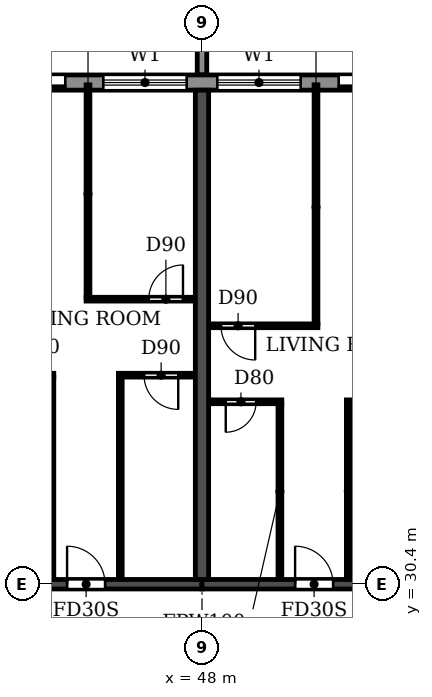
"""IFC4 building model, lengths in metres.
Left out: names, types, materials, properties, quantities, classifications, styles, units other than length and angle.
Written with IfcOpenShell. Run it as: python <this file> out.ifc"""

import sys

from ifc_helpers import new_model, si_unit, direction, frame, frame_2d, origin, place, context, subcontext, project, spatial, polyline, rectangle, outline, extrude, source, transform, mapped, element, fill, save


model = new_model("IFC4")
c1 = context("Model", 3, precision=1e-05, world=origin(), true_north=direction((0.0, 1.0)))
c2 = subcontext(c1, "Body", "Model", "MODEL_VIEW")
j1 = project(units=[si_unit("LENGTHUNIT", "METRE"), si_unit("PLANEANGLEUNIT", "RADIAN")], contexts=[c1])
p1 = place(None, origin())
s1 = spatial("IfcSite", under=j1, at=p1, CompositionType="ELEMENT")
p2 = place(p1, origin())
s2 = spatial("IfcBuilding", under=s1, at=p2, CompositionType="ELEMENT")
p3 = place(p2, frame((0.0, 0.0, 76.2)))
s3 = spatial("IfcBuildingStorey", under=s2, at=p3, CompositionType="ELEMENT", Elevation=76.2)
p4 = place(p3, frame((48.0, 30.525, 0.0), z_axis=(0.0, 0.0, 1.0), x_axis=(0.0, 1.0, 0.0)))
e1 = element("IfcWall", 1, at=p4, inside=s3, PredefinedType="SHEAR", context=c2, shape_type="SweptSolid", body=[
    extrude(rectangle(XDim=12.875, YDim=0.35, at=frame_2d((6.438, 0.0))), origin(), (0.0, 0.0, 1.0), 3.06),
])
p5 = place(p3, frame((42.0, 30.4, 0.0), z_axis=(0.0, 0.0, 1.0), x_axis=(1.0, 0.0, 0.0)))
e2 = element("IfcWall", 2, at=p5, inside=s3, PredefinedType="SHEAR", context=c2, shape_type="SweptSolid", body=[
    extrude(rectangle(XDim=6.0, YDim=0.25, at=frame_2d((3.0, 0.0))), origin(), (0.0, 0.0, 1.0), 2.46),
])
p6 = place(p5, frame((2.45, 0.0, 0.0)))
e3 = element("IfcOpeningElement", 3, at=p6, cuts=e2, PredefinedType="OPENING", context=c2, shape_type="SweptSolid", body=[
    extrude(rectangle(XDim=1.0, YDim=2.1, at=frame_2d((0.5, 1.05))), frame((0.0, 0.135, 0.0), z_axis=(0.0, -1.0, 0.0), x_axis=(1.0, 0.0, 0.0)), (0.0, 0.0, 1.0), 0.27),
])
p7 = place(p3, frame((48.0, 30.4, 0.0), z_axis=(0.0, 0.0, 1.0), x_axis=(1.0, 0.0, 0.0)))
e4 = element("IfcWall", 4, at=p7, inside=s3, PredefinedType="SHEAR", context=c2, shape_type="SweptSolid", body=[
    extrude(rectangle(XDim=6.0, YDim=0.25, at=frame_2d((3.0, 0.0))), origin(), (0.0, 0.0, 1.0), 2.46),
])
p8 = place(p7, frame((2.45, 0.0, 0.0)))
e5 = element("IfcOpeningElement", 5, at=p8, cuts=e4, PredefinedType="OPENING", context=c2, shape_type="SweptSolid", body=[
    extrude(rectangle(XDim=1.0, YDim=2.1, at=frame_2d((0.5, 1.05))), frame((0.0, 0.135, 0.0), z_axis=(0.0, -1.0, 0.0), x_axis=(1.0, 0.0, 0.0)), (0.0, 0.0, 1.0), 0.27),
])
p9 = place(p3, frame((91.317, 43.6, 0.0), z_axis=(0.0, 0.0, 1.0), x_axis=(-1.0, 0.0, 0.0)))
e6 = element("IfcWall", 6, at=p9, inside=s3, PredefinedType="STANDARD", context=c2, shape_type="SweptSolid", body=[
    extrude(rectangle(XDim=80.634, YDim=0.4, at=frame_2d((40.317, 0.0))), origin(), (0.0, 0.0, 1.0), 3.06),
])
p10 = place(p9, frame((76.717, 0.0, 0.9)))
e7 = element("IfcOpeningElement", 7, at=p10, cuts=e6, PredefinedType="OPENING", context=c2, shape_type="SweptSolid", body=[
    extrude(rectangle(XDim=2.2, YDim=1.5, at=frame_2d((1.1, 0.75))), frame((0.0, 0.21, 0.0), z_axis=(0.0, -1.0, 0.0), x_axis=(1.0, 0.0, 0.0)), (0.0, 0.0, 1.0), 0.42),
])
p11 = place(p9, frame((73.917, 0.0, 0.0)))
e8 = element("IfcOpeningElement", 8, at=p11, cuts=e6, PredefinedType="OPENING", context=c2, shape_type="SweptSolid", body=[
    extrude(rectangle(XDim=1.8, YDim=2.4, at=frame_2d((0.9, 1.2))), frame((0.0, 0.21, 0.0), z_axis=(0.0, -1.0, 0.0), x_axis=(1.0, 0.0, 0.0)), (0.0, 0.0, 1.0), 0.42),
])
p12 = place(p9, frame((70.917, 0.0, 0.0)))
e9 = element("IfcOpeningElement", 9, at=p12, cuts=e6, PredefinedType="OPENING", context=c2, shape_type="SweptSolid", body=[
    extrude(rectangle(XDim=1.8, YDim=2.4, at=frame_2d((0.9, 1.2))), frame((0.0, 0.21, 0.0), z_axis=(0.0, -1.0, 0.0), x_axis=(1.0, 0.0, 0.0)), (0.0, 0.0, 1.0), 0.42),
])
p13 = place(p9, frame((67.717, 0.0, 0.9)))
e10 = element("IfcOpeningElement", 10, at=p13, cuts=e6, PredefinedType="OPENING", context=c2, shape_type="SweptSolid", body=[
    extrude(rectangle(XDim=2.2, YDim=1.5, at=frame_2d((1.1, 0.75))), frame((0.0, 0.21, 0.0), z_axis=(0.0, -1.0, 0.0), x_axis=(1.0, 0.0, 0.0)), (0.0, 0.0, 1.0), 0.42),
])
p14 = place(p9, frame((64.717, 0.0, 0.9)))
e11 = element("IfcOpeningElement", 11, at=p14, cuts=e6, PredefinedType="OPENING", context=c2, shape_type="SweptSolid", body=[
    extrude(rectangle(XDim=2.2, YDim=1.5, at=frame_2d((1.1, 0.75))), frame((0.0, 0.21, 0.0), z_axis=(0.0, -1.0, 0.0), x_axis=(1.0, 0.0, 0.0)), (0.0, 0.0, 1.0), 0.42),
])
p15 = place(p9, frame((61.917, 0.0, 0.0)))
e12 = element("IfcOpeningElement", 12, at=p15, cuts=e6, PredefinedType="OPENING", context=c2, shape_type="SweptSolid", body=[
    extrude(rectangle(XDim=1.8, YDim=2.4, at=frame_2d((0.9, 1.2))), frame((0.0, 0.21, 0.0), z_axis=(0.0, -1.0, 0.0), x_axis=(1.0, 0.0, 0.0)), (0.0, 0.0, 1.0), 0.42),
])
p16 = place(p9, frame((58.717, 0.0, 0.9)))
e13 = element("IfcOpeningElement", 13, at=p16, cuts=e6, PredefinedType="OPENING", context=c2, shape_type="SweptSolid", body=[
    extrude(rectangle(XDim=2.2, YDim=1.5, at=frame_2d((1.1, 0.75))), frame((0.0, 0.21, 0.0), z_axis=(0.0, -1.0, 0.0), x_axis=(1.0, 0.0, 0.0)), (0.0, 0.0, 1.0), 0.42),
])
p17 = place(p9, frame((55.917, 0.0, 0.0)))
e14 = element("IfcOpeningElement", 14, at=p17, cuts=e6, PredefinedType="OPENING", context=c2, shape_type="SweptSolid", body=[
    extrude(rectangle(XDim=1.8, YDim=2.4, at=frame_2d((0.9, 1.2))), frame((0.0, 0.21, 0.0), z_axis=(0.0, -1.0, 0.0), x_axis=(1.0, 0.0, 0.0)), (0.0, 0.0, 1.0), 0.42),
])
p18 = place(p9, frame((52.717, 0.0, 0.9)))
e15 = element("IfcOpeningElement", 15, at=p18, cuts=e6, PredefinedType="OPENING", context=c2, shape_type="SweptSolid", body=[
    extrude(rectangle(XDim=2.2, YDim=1.5, at=frame_2d((1.1, 0.75))), frame((0.0, 0.21, 0.0), z_axis=(0.0, -1.0, 0.0), x_axis=(1.0, 0.0, 0.0)), (0.0, 0.0, 1.0), 0.42),
])
p19 = place(p9, frame((49.717, 0.0, 0.9)))
e16 = element("IfcOpeningElement", 16, at=p19, cuts=e6, PredefinedType="OPENING", context=c2, shape_type="SweptSolid", body=[
    extrude(rectangle(XDim=2.2, YDim=1.5, at=frame_2d((1.1, 0.75))), frame((0.0, 0.21, 0.0), z_axis=(0.0, -1.0, 0.0), x_axis=(1.0, 0.0, 0.0)), (0.0, 0.0, 1.0), 0.42),
])
p20 = place(p9, frame((46.917, 0.0, 0.0)))
e17 = element("IfcOpeningElement", 17, at=p20, cuts=e6, PredefinedType="OPENING", context=c2, shape_type="SweptSolid", body=[
    extrude(rectangle(XDim=1.8, YDim=2.4, at=frame_2d((0.9, 1.2))), frame((0.0, 0.21, 0.0), z_axis=(0.0, -1.0, 0.0), x_axis=(1.0, 0.0, 0.0)), (0.0, 0.0, 1.0), 0.42),
])
p21 = place(p9, frame((43.717, 0.0, 0.9)))
e18 = element("IfcOpeningElement", 18, at=p21, cuts=e6, PredefinedType="OPENING", context=c2, shape_type="SweptSolid", body=[
    extrude(rectangle(XDim=2.2, YDim=1.5, at=frame_2d((1.1, 0.75))), frame((0.0, 0.21, 0.0), z_axis=(0.0, -1.0, 0.0), x_axis=(1.0, 0.0, 0.0)), (0.0, 0.0, 1.0), 0.42),
])
p22 = place(p9, frame((40.717, 0.0, 0.9)))
e19 = element("IfcOpeningElement", 19, at=p22, cuts=e6, PredefinedType="OPENING", context=c2, shape_type="SweptSolid", body=[
    extrude(rectangle(XDim=2.2, YDim=1.5, at=frame_2d((1.1, 0.75))), frame((0.0, 0.21, 0.0), z_axis=(0.0, -1.0, 0.0), x_axis=(1.0, 0.0, 0.0)), (0.0, 0.0, 1.0), 0.42),
])
p23 = place(p9, frame((37.917, 0.0, 0.0)))
e20 = element("IfcOpeningElement", 20, at=p23, cuts=e6, PredefinedType="OPENING", context=c2, shape_type="SweptSolid", body=[
    extrude(rectangle(XDim=1.8, YDim=2.4, at=frame_2d((0.9, 1.2))), frame((0.0, 0.21, 0.0), z_axis=(0.0, -1.0, 0.0), x_axis=(1.0, 0.0, 0.0)), (0.0, 0.0, 1.0), 0.42),
])
p24 = place(p9, frame((34.717, 0.0, 0.9)))
e21 = element("IfcOpeningElement", 21, at=p24, cuts=e6, PredefinedType="OPENING", context=c2, shape_type="SweptSolid", body=[
    extrude(rectangle(XDim=2.2, YDim=1.5, at=frame_2d((1.1, 0.75))), frame((0.0, 0.21, 0.0), z_axis=(0.0, -1.0, 0.0), x_axis=(1.0, 0.0, 0.0)), (0.0, 0.0, 1.0), 0.42),
])
p25 = place(p9, frame((31.917, 0.0, 0.0)))
e22 = element("IfcOpeningElement", 22, at=p25, cuts=e6, PredefinedType="OPENING", context=c2, shape_type="SweptSolid", body=[
    extrude(rectangle(XDim=1.8, YDim=2.4, at=frame_2d((0.9, 1.2))), frame((0.0, 0.21, 0.0), z_axis=(0.0, -1.0, 0.0), x_axis=(1.0, 0.0, 0.0)), (0.0, 0.0, 1.0), 0.42),
])
p26 = place(p9, frame((28.717, 0.0, 0.9)))
e23 = element("IfcOpeningElement", 23, at=p26, cuts=e6, PredefinedType="OPENING", context=c2, shape_type="SweptSolid", body=[
    extrude(rectangle(XDim=2.2, YDim=1.5, at=frame_2d((1.1, 0.75))), frame((0.0, 0.21, 0.0), z_axis=(0.0, -1.0, 0.0), x_axis=(1.0, 0.0, 0.0)), (0.0, 0.0, 1.0), 0.42),
])
p27 = place(p9, frame((25.717, 0.0, 0.9)))
e24 = element("IfcOpeningElement", 24, at=p27, cuts=e6, PredefinedType="OPENING", context=c2, shape_type="SweptSolid", body=[
    extrude(rectangle(XDim=2.2, YDim=1.5, at=frame_2d((1.1, 0.75))), frame((0.0, 0.21, 0.0), z_axis=(0.0, -1.0, 0.0), x_axis=(1.0, 0.0, 0.0)), (0.0, 0.0, 1.0), 0.42),
])
p28 = place(p9, frame((22.717, 0.0, 0.9)))
e25 = element("IfcOpeningElement", 25, at=p28, cuts=e6, PredefinedType="OPENING", context=c2, shape_type="SweptSolid", body=[
    extrude(rectangle(XDim=2.2, YDim=1.5, at=frame_2d((1.1, 0.75))), frame((0.0, 0.21, 0.0), z_axis=(0.0, -1.0, 0.0), x_axis=(1.0, 0.0, 0.0)), (0.0, 0.0, 1.0), 0.42),
])
p29 = place(p9, frame((19.917, 0.0, 0.0)))
e26 = element("IfcOpeningElement", 26, at=p29, cuts=e6, PredefinedType="OPENING", context=c2, shape_type="SweptSolid", body=[
    extrude(rectangle(XDim=1.8, YDim=2.4, at=frame_2d((0.9, 1.2))), frame((0.0, 0.21, 0.0), z_axis=(0.0, -1.0, 0.0), x_axis=(1.0, 0.0, 0.0)), (0.0, 0.0, 1.0), 0.42),
])
p30 = place(p9, frame((16.717, 0.0, 0.9)))
e27 = element("IfcOpeningElement", 27, at=p30, cuts=e6, PredefinedType="OPENING", context=c2, shape_type="SweptSolid", body=[
    extrude(rectangle(XDim=2.2, YDim=1.5, at=frame_2d((1.1, 0.75))), frame((0.0, 0.21, 0.0), z_axis=(0.0, -1.0, 0.0), x_axis=(1.0, 0.0, 0.0)), (0.0, 0.0, 1.0), 0.42),
])
p31 = place(p9, frame((13.717, 0.0, 0.9)))
e28 = element("IfcOpeningElement", 28, at=p31, cuts=e6, PredefinedType="OPENING", context=c2, shape_type="SweptSolid", body=[
    extrude(rectangle(XDim=2.2, YDim=1.5, at=frame_2d((1.1, 0.75))), frame((0.0, 0.21, 0.0), z_axis=(0.0, -1.0, 0.0), x_axis=(1.0, 0.0, 0.0)), (0.0, 0.0, 1.0), 0.42),
])
p32 = place(p9, frame((10.717, 0.0, 0.9)))
e29 = element("IfcOpeningElement", 29, at=p32, cuts=e6, PredefinedType="OPENING", context=c2, shape_type="SweptSolid", body=[
    extrude(rectangle(XDim=2.2, YDim=1.5, at=frame_2d((1.1, 0.75))), frame((0.0, 0.21, 0.0), z_axis=(0.0, -1.0, 0.0), x_axis=(1.0, 0.0, 0.0)), (0.0, 0.0, 1.0), 0.42),
])
p33 = place(p9, frame((7.917, 0.0, 0.0)))
e30 = element("IfcOpeningElement", 30, at=p33, cuts=e6, PredefinedType="OPENING", context=c2, shape_type="SweptSolid", body=[
    extrude(rectangle(XDim=1.8, YDim=2.4, at=frame_2d((0.9, 1.2))), frame((0.0, 0.21, 0.0), z_axis=(0.0, -1.0, 0.0), x_axis=(1.0, 0.0, 0.0)), (0.0, 0.0, 1.0), 0.42),
])
p34 = place(p9, frame((4.717, 0.0, 0.9)))
e31 = element("IfcOpeningElement", 31, at=p34, cuts=e6, PredefinedType="OPENING", context=c2, shape_type="SweptSolid", body=[
    extrude(rectangle(XDim=2.2, YDim=1.5, at=frame_2d((1.1, 0.75))), frame((0.0, 0.21, 0.0), z_axis=(0.0, -1.0, 0.0), x_axis=(1.0, 0.0, 0.0)), (0.0, 0.0, 1.0), 0.42),
])
p35 = place(p9, frame((1.917, 0.0, 0.0)))
e32 = element("IfcOpeningElement", 32, at=p35, cuts=e6, PredefinedType="OPENING", context=c2, shape_type="SweptSolid", body=[
    extrude(rectangle(XDim=1.8, YDim=2.4, at=frame_2d((0.9, 1.2))), frame((0.0, 0.21, 0.0), z_axis=(0.0, -1.0, 0.0), x_axis=(1.0, 0.0, 0.0)), (0.0, 0.0, 1.0), 0.42),
])
m1 = source(origin(), c2, "Body", "SweptSolid", [
    extrude(outline(polyline([(0.0, 0.0), (0.25, 0.0), (0.25, 3.1), (0.0, 3.1), (0.0, 0.0)])), origin(), (0.0, 0.0, 1.0), 3.1),
])
p36 = place(p3, frame((47.875, 43.8, 0.0)))
e33 = element("IfcWall", 33, at=p36, inside=s3, PredefinedType="STANDARD", context=c2, shape_type="MappedRepresentation", body=[
    mapped(m1, transform((0.0, 0.0, 0.0))),
])
p37 = place(p3, frame((48.185, 35.2, 0.0), z_axis=(0.0, 0.0, 1.0), x_axis=(1.0, 0.0, 0.0)))
e34 = element("IfcWall", 34, at=p37, inside=s3, PredefinedType="PARTITIONING", context=c2, shape_type="SweptSolid", body=[
    extrude(rectangle(XDim=1.915, YDim=0.1, at=frame_2d((0.958, 0.0))), origin(), (0.0, 0.0, 1.0), 3.06),
])
p38 = place(p37, frame((0.44, 0.0, 0.0)))
e35 = element("IfcOpeningElement", 35, at=p38, cuts=e34, PredefinedType="OPENING", context=c2, shape_type="SweptSolid", body=[
    extrude(rectangle(XDim=0.8, YDim=2.1, at=frame_2d((0.4, 1.05))), frame((0.0, 0.06, 0.0), z_axis=(0.0, -1.0, 0.0), x_axis=(1.0, 0.0, 0.0)), (0.0, 0.0, 1.0), 0.12),
])
p39 = place(p3, frame((51.8, 35.2, 0.0), z_axis=(0.0, 0.0, 1.0), x_axis=(1.0, 0.0, 0.0)))
e36 = element("IfcWall", 36, at=p39, inside=s3, PredefinedType="PARTITIONING", context=c2, shape_type="SweptSolid", body=[
    extrude(rectangle(XDim=2.015, YDim=0.1, at=frame_2d((1.007, 0.0))), origin(), (0.0, 0.0, 1.0), 3.06),
])
p40 = place(p39, frame((0.675, 0.0, 0.0)))
e37 = element("IfcOpeningElement", 37, at=p40, cuts=e36, PredefinedType="OPENING", context=c2, shape_type="SweptSolid", body=[
    extrude(rectangle(XDim=0.9, YDim=2.1, at=frame_2d((0.45, 1.05))), frame((0.0, 0.06, 0.0), z_axis=(0.0, -1.0, 0.0), x_axis=(1.0, 0.0, 0.0)), (0.0, 0.0, 1.0), 0.12),
])
p41 = place(p3, frame((42.185, 35.9, 0.0), z_axis=(0.0, 0.0, 1.0), x_axis=(1.0, 0.0, 0.0)))
e38 = element("IfcWall", 38, at=p41, inside=s3, PredefinedType="PARTITIONING", context=c2, shape_type="SweptSolid", body=[
    extrude(rectangle(XDim=1.915, YDim=0.1, at=frame_2d((0.958, 0.0))), origin(), (0.0, 0.0, 1.0), 3.06),
])
p42 = place(p41, frame((0.44, 0.0, 0.0)))
e39 = element("IfcOpeningElement", 39, at=p42, cuts=e38, PredefinedType="OPENING", context=c2, shape_type="SweptSolid", body=[
    extrude(rectangle(XDim=0.8, YDim=2.1, at=frame_2d((0.4, 1.05))), frame((0.0, 0.06, 0.0), z_axis=(0.0, -1.0, 0.0), x_axis=(1.0, 0.0, 0.0)), (0.0, 0.0, 1.0), 0.12),
])
p43 = place(p3, frame((45.8, 35.9, 0.0), z_axis=(0.0, 0.0, 1.0), x_axis=(1.0, 0.0, 0.0)))
e40 = element("IfcWall", 40, at=p43, inside=s3, PredefinedType="PARTITIONING", context=c2, shape_type="SweptSolid", body=[
    extrude(rectangle(XDim=2.015, YDim=0.1, at=frame_2d((1.007, 0.0))), origin(), (0.0, 0.0, 1.0), 3.06),
])
p44 = place(p43, frame((0.675, 0.0, 0.0)))
e41 = element("IfcOpeningElement", 41, at=p44, cuts=e40, PredefinedType="OPENING", context=c2, shape_type="SweptSolid", body=[
    extrude(rectangle(XDim=0.9, YDim=2.1, at=frame_2d((0.45, 1.05))), frame((0.0, 0.06, 0.0), z_axis=(0.0, -1.0, 0.0), x_axis=(1.0, 0.0, 0.0)), (0.0, 0.0, 1.0), 0.12),
])
p45 = place(p3, frame((48.185, 37.2, 0.0), z_axis=(0.0, 0.0, 1.0), x_axis=(1.0, 0.0, 0.0)))
e42 = element("IfcWall", 42, at=p45, inside=s3, PredefinedType="PARTITIONING", context=c2, shape_type="SweptSolid", body=[
    extrude(rectangle(XDim=2.865, YDim=0.1, at=frame_2d((1.433, 0.0))), origin(), (0.0, 0.0, 1.0), 3.06),
])
p46 = place(p45, frame((0.315, 0.0, 0.0)))
e43 = element("IfcOpeningElement", 43, at=p46, cuts=e42, PredefinedType="OPENING", context=c2, shape_type="SweptSolid", body=[
    extrude(rectangle(XDim=0.9, YDim=2.1, at=frame_2d((0.45, 1.05))), frame((0.0, 0.06, 0.0), z_axis=(0.0, -1.0, 0.0), x_axis=(1.0, 0.0, 0.0)), (0.0, 0.0, 1.0), 0.12),
])
p47 = place(p3, frame((44.95, 37.9, 0.0), z_axis=(0.0, 0.0, 1.0), x_axis=(1.0, 0.0, 0.0)))
e44 = element("IfcWall", 44, at=p47, inside=s3, PredefinedType="PARTITIONING", context=c2, shape_type="SweptSolid", body=[
    extrude(rectangle(XDim=2.865, YDim=0.1, at=frame_2d((1.433, 0.0))), origin(), (0.0, 0.0, 1.0), 3.06),
])
p48 = place(p47, frame((1.65, 0.0, 0.0)))
e45 = element("IfcOpeningElement", 45, at=p48, cuts=e44, PredefinedType="OPENING", context=c2, shape_type="SweptSolid", body=[
    extrude(rectangle(XDim=0.9, YDim=2.1, at=frame_2d((0.45, 1.05))), frame((0.0, 0.06, 0.0), z_axis=(0.0, -1.0, 0.0), x_axis=(1.0, 0.0, 0.0)), (0.0, 0.0, 1.0), 0.12),
])
p49 = place(p3, frame((44.05, 30.535, 0.0), z_axis=(0.0, 0.0, 1.0), x_axis=(0.0, 1.0, 0.0)))
e46 = element("IfcWall", 46, at=p49, inside=s3, PredefinedType="PARTITIONING", context=c2, shape_type="SweptSolid", body=[
    extrude(rectangle(XDim=5.315, YDim=0.1, at=frame_2d((2.658, 0.0))), origin(), (0.0, 0.0, 1.0), 3.06),
])
p50 = place(p3, frame((45.0, 37.95, 0.0), z_axis=(0.0, 0.0, 1.0), x_axis=(0.0, 1.0, 0.0)))
e47 = element("IfcWall", 47, at=p50, inside=s3, PredefinedType="PARTITIONING", context=c2, shape_type="SweptSolid", body=[
    extrude(rectangle(XDim=5.59, YDim=0.1, at=frame_2d((2.795, 0.0))), origin(), (0.0, 0.0, 1.0), 3.06),
])
p51 = place(p3, frame((45.85, 30.535, 0.0), z_axis=(0.0, 0.0, 1.0), x_axis=(0.0, 1.0, 0.0)))
e48 = element("IfcWall", 48, at=p51, inside=s3, PredefinedType="PARTITIONING", context=c2, shape_type="SweptSolid", body=[
    extrude(rectangle(XDim=5.315, YDim=0.1, at=frame_2d((2.658, 0.0))), origin(), (0.0, 0.0, 1.0), 3.06),
])
p52 = place(p3, frame((50.05, 30.535, 0.0), z_axis=(0.0, 0.0, 1.0), x_axis=(0.0, 1.0, 0.0)))
e49 = element("IfcWall", 49, at=p52, inside=s3, PredefinedType="PARTITIONING", context=c2, shape_type="SweptSolid", body=[
    extrude(rectangle(XDim=4.615, YDim=0.1, at=frame_2d((2.308, 0.0))), origin(), (0.0, 0.0, 1.0), 3.06),
])
p53 = place(p3, frame((51.0, 37.25, 0.0), z_axis=(0.0, 0.0, 1.0), x_axis=(0.0, 1.0, 0.0)))
e50 = element("IfcWall", 50, at=p53, inside=s3, PredefinedType="PARTITIONING", context=c2, shape_type="SweptSolid", body=[
    extrude(rectangle(XDim=6.29, YDim=0.1, at=frame_2d((3.145, 0.0))), origin(), (0.0, 0.0, 1.0), 3.06),
])
p54 = place(p3, frame((51.85, 30.535, 0.0), z_axis=(0.0, 0.0, 1.0), x_axis=(0.0, 1.0, 0.0)))
e51 = element("IfcWall", 51, at=p54, inside=s3, PredefinedType="PARTITIONING", context=c2, shape_type="SweptSolid", body=[
    extrude(rectangle(XDim=4.615, YDim=0.1, at=frame_2d((2.308, 0.0))), origin(), (0.0, 0.0, 1.0), 3.06),
])
p55 = place(p20, origin())
e52 = element("IfcDoor", 52, at=p55, inside=s3, OperationType="DOUBLE_DOOR_SLIDING", PredefinedType="DOOR", context=c2, shape_type="SweptSolid", body=[
    extrude(rectangle(XDim=1.8, YDim=2.4, at=frame_2d((0.9, 1.2))), frame((0.0, 0.025, 0.0), z_axis=(0.0, -1.0, 0.0), x_axis=(1.0, 0.0, 0.0)), (0.0, 0.0, 1.0), 0.05),
])
fill(e17, e52)
p56 = place(p21, origin())
e53 = element("IfcWindow", 53, at=p56, inside=s3, PartitioningType="DOUBLE_PANEL_HORIZONTAL", PredefinedType="WINDOW", context=c2, shape_type="SweptSolid", body=[
    extrude(rectangle(XDim=2.2, YDim=1.5, at=frame_2d((1.1, 0.75))), frame((0.0, 0.03, 0.0), z_axis=(0.0, -1.0, 0.0), x_axis=(1.0, 0.0, 0.0)), (0.0, 0.0, 1.0), 0.06),
])
fill(e18, e53)
p57 = place(p22, origin())
e54 = element("IfcWindow", 54, at=p57, inside=s3, PartitioningType="DOUBLE_PANEL_HORIZONTAL", PredefinedType="WINDOW", context=c2, shape_type="SweptSolid", body=[
    extrude(rectangle(XDim=2.2, YDim=1.5, at=frame_2d((1.1, 0.75))), frame((0.0, 0.03, 0.0), z_axis=(0.0, -1.0, 0.0), x_axis=(1.0, 0.0, 0.0)), (0.0, 0.0, 1.0), 0.06),
])
fill(e19, e54)
p58 = place(p23, origin())
e55 = element("IfcDoor", 55, at=p58, inside=s3, OperationType="DOUBLE_DOOR_SLIDING", PredefinedType="DOOR", context=c2, shape_type="SweptSolid", body=[
    extrude(rectangle(XDim=1.8, YDim=2.4, at=frame_2d((0.9, 1.2))), frame((0.0, 0.025, 0.0), z_axis=(0.0, -1.0, 0.0), x_axis=(1.0, 0.0, 0.0)), (0.0, 0.0, 1.0), 0.05),
])
fill(e20, e55)
p59 = place(p6, origin())
e56 = element("IfcDoor", 56, at=p59, inside=s3, OperationType="SINGLE_SWING_LEFT", PredefinedType="DOOR", context=c2, shape_type="SweptSolid", body=[
    extrude(rectangle(XDim=1.0, YDim=2.1, at=frame_2d((0.5, 1.05))), frame((0.0, 0.025, 0.0), z_axis=(0.0, -1.0, 0.0), x_axis=(1.0, 0.0, 0.0)), (0.0, 0.0, 1.0), 0.05),
])
fill(e3, e56)
p60 = place(p44, frame((0.9, 0.0, 0.0), z_axis=(0.0, 0.0, 1.0), x_axis=(-1.0, 0.0, 0.0)))
e57 = element("IfcDoor", 57, at=p60, inside=s3, OperationType="SINGLE_SWING_LEFT", PredefinedType="DOOR", context=c2, shape_type="SweptSolid", body=[
    extrude(rectangle(XDim=0.9, YDim=2.1, at=frame_2d((0.45, 1.05))), frame((0.0, 0.025, 0.0), z_axis=(0.0, -1.0, 0.0), x_axis=(1.0, 0.0, 0.0)), (0.0, 0.0, 1.0), 0.05),
])
fill(e41, e57)
p61 = place(p48, origin())
e58 = element("IfcDoor", 58, at=p61, inside=s3, OperationType="SINGLE_SWING_RIGHT", PredefinedType="DOOR", context=c2, shape_type="SweptSolid", body=[
    extrude(rectangle(XDim=0.9, YDim=2.1, at=frame_2d((0.45, 1.05))), frame((0.0, 0.025, 0.0), z_axis=(0.0, -1.0, 0.0), x_axis=(1.0, 0.0, 0.0)), (0.0, 0.0, 1.0), 0.05),
])
fill(e45, e58)
p62 = place(p46, frame((0.9, 0.0, 0.0), z_axis=(0.0, 0.0, 1.0), x_axis=(-1.0, 0.0, 0.0)))
e59 = element("IfcDoor", 59, at=p62, inside=s3, OperationType="SINGLE_SWING_LEFT", PredefinedType="DOOR", context=c2, shape_type="SweptSolid", body=[
    extrude(rectangle(XDim=0.9, YDim=2.1, at=frame_2d((0.45, 1.05))), frame((0.0, 0.025, 0.0), z_axis=(0.0, -1.0, 0.0), x_axis=(1.0, 0.0, 0.0)), (0.0, 0.0, 1.0), 0.05),
])
fill(e43, e59)
p63 = place(p38, frame((0.8, 0.0, 0.0), z_axis=(0.0, 0.0, 1.0), x_axis=(-1.0, 0.0, 0.0)))
e60 = element("IfcDoor", 60, at=p63, inside=s3, OperationType="SINGLE_SWING_RIGHT", PredefinedType="DOOR", context=c2, shape_type="SweptSolid", body=[
    extrude(rectangle(XDim=0.8, YDim=2.1, at=frame_2d((0.4, 1.05))), frame((0.0, 0.025, 0.0), z_axis=(0.0, -1.0, 0.0), x_axis=(1.0, 0.0, 0.0)), (0.0, 0.0, 1.0), 0.05),
])
fill(e35, e60)
p64 = place(p8, origin())
e61 = element("IfcDoor", 61, at=p64, inside=s3, OperationType="SINGLE_SWING_LEFT", PredefinedType="DOOR", context=c2, shape_type="SweptSolid", body=[
    extrude(rectangle(XDim=1.0, YDim=2.1, at=frame_2d((0.5, 1.05))), frame((0.0, 0.025, 0.0), z_axis=(0.0, -1.0, 0.0), x_axis=(1.0, 0.0, 0.0)), (0.0, 0.0, 1.0), 0.05),
])
fill(e5, e61)
save(model, sys.argv[1])
